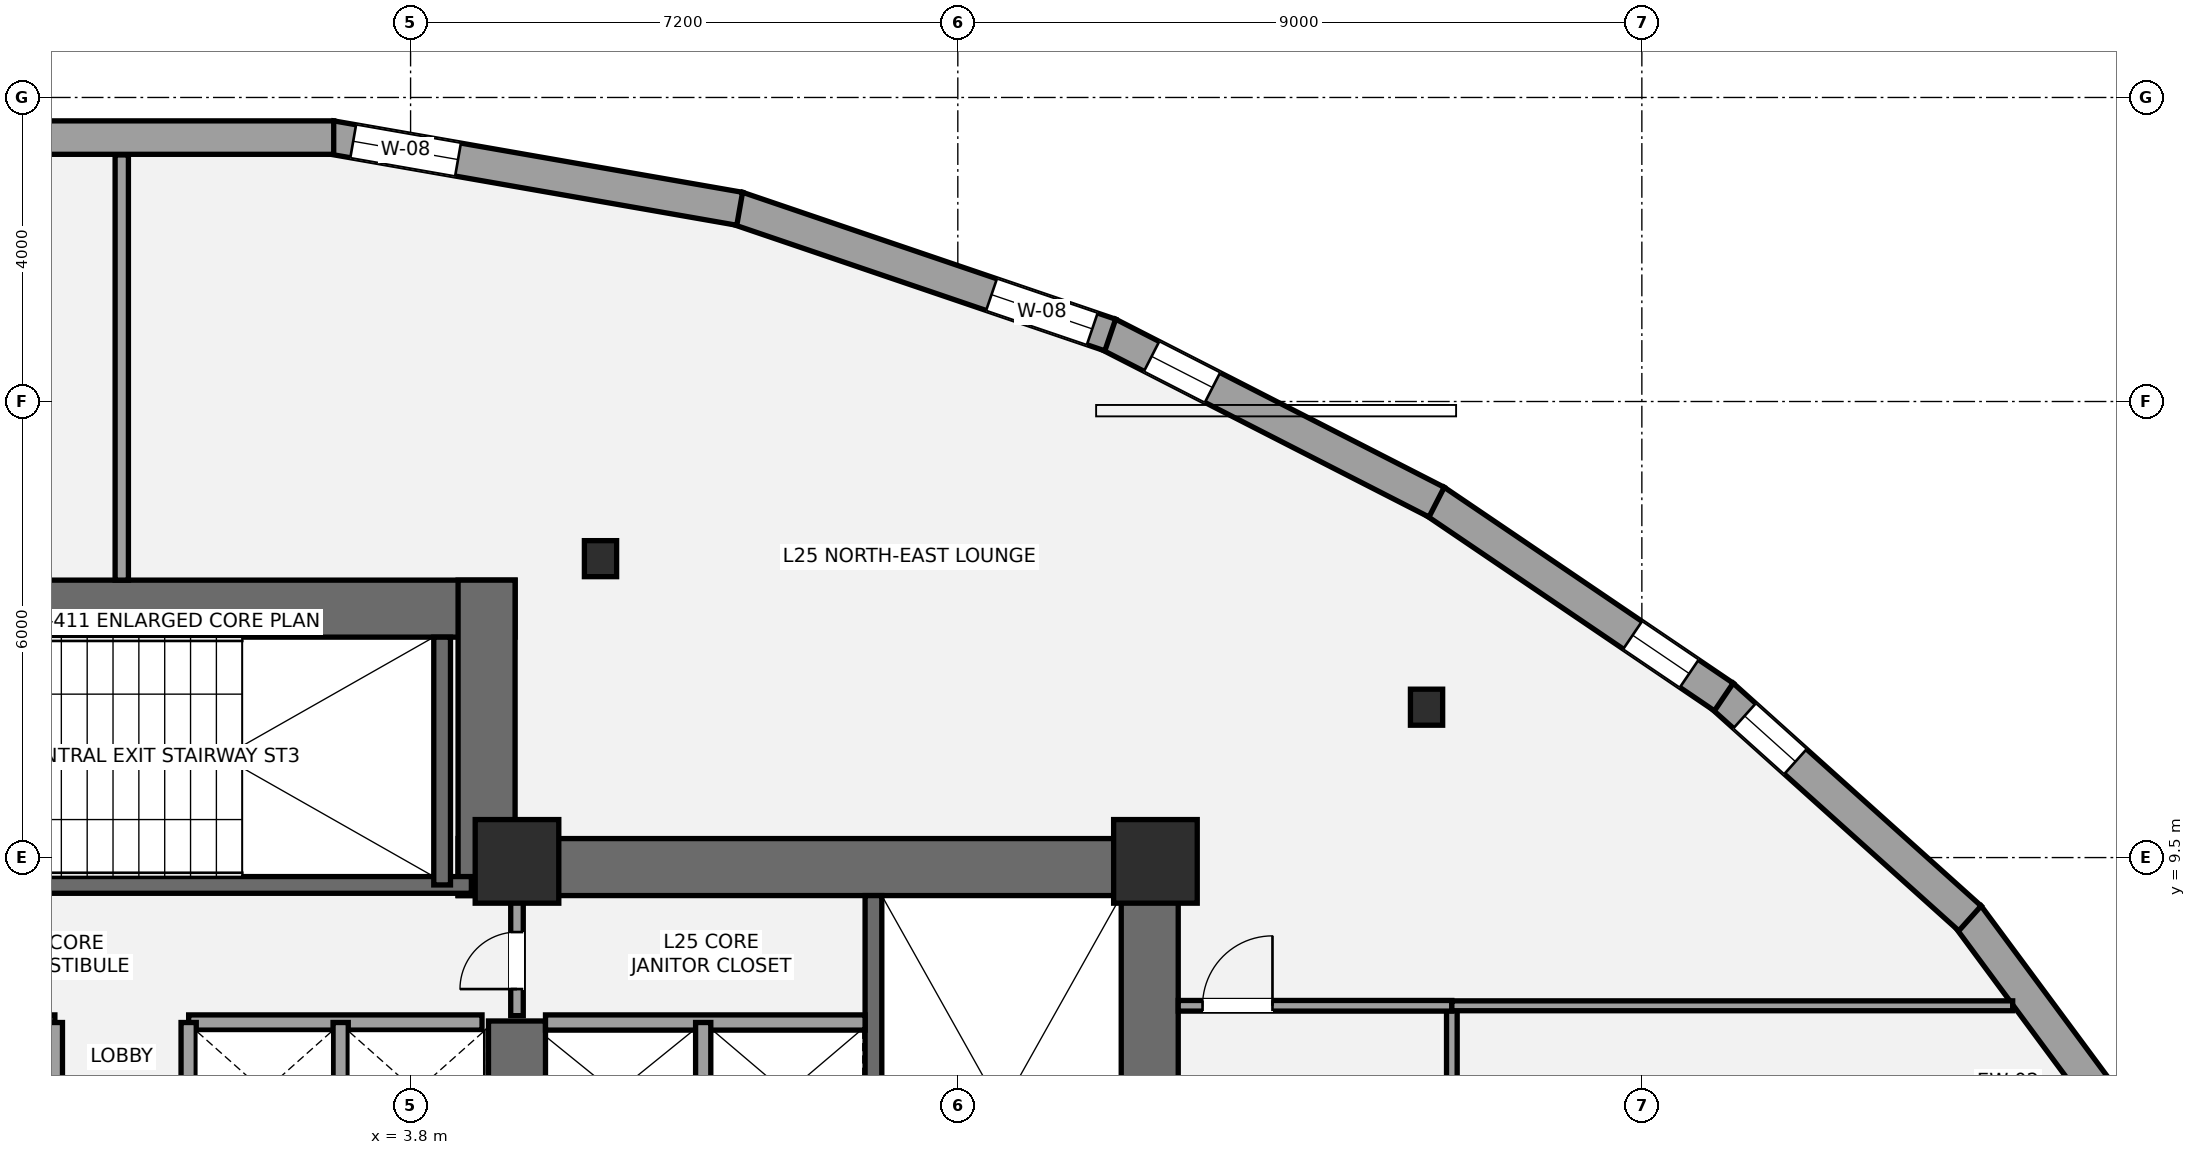
"""IFC4 building model, lengths in metres.
Left out: names, types, materials, properties, quantities, classifications, styles, units other than length and angle.
Written with IfcOpenShell. Run it as: python <this file> out.ifc"""

import sys

from ifc_helpers import new_model, si_unit, direction, frame, frame_2d, origin, origin_2d, place, context, subcontext, project, spatial, rectangle, i_section, extrude, element, fill, save


model = new_model("IFC4")
c1 = context("Model", 3, precision=1e-05, world=origin(), true_north=direction((0.0, 1.0)))
c2 = subcontext(c1, "Body", "Model", "MODEL_VIEW")
j1 = project(units=[si_unit("LENGTHUNIT", "METRE"), si_unit("PLANEANGLEUNIT", "RADIAN")], contexts=[c1])
p1 = place(None, origin())
s1 = spatial("IfcSite", under=j1, at=p1, CompositionType="ELEMENT")
p2 = place(p1, origin())
s2 = spatial("IfcBuilding", under=s1, at=p2, CompositionType="ELEMENT")
p3 = place(p2, frame((0.0, 0.0, 96.6)))
s3 = spatial("IfcBuildingStorey", under=s2, at=p3, CompositionType="ELEMENT", Elevation=96.6)
p4 = place(p3, frame((13.525, 1.1, 0.0), z_axis=(0.0, 0.0, 1.0), x_axis=(0.0, 1.0, 0.0)))
e1 = element("IfcWall", 1, at=p4, inside=s3, PredefinedType="SHEAR", context=c2, shape_type="SweptSolid", body=[
    extrude(rectangle(XDim=8.65, YDim=0.75, at=frame_2d((4.325, 0.0))), origin(), (0.0, 0.0, 1.0), 3.5),
])
p5 = place(p3, frame((4.425, 9.375, 0.0), z_axis=(0.0, 0.0, 1.0), x_axis=(1.0, 0.0, 0.0)))
e2 = element("IfcWall", 2, at=p5, inside=s3, PredefinedType="SHEAR", context=c2, shape_type="SweptSolid", body=[
    extrude(rectangle(XDim=9.475, YDim=0.75, at=frame_2d((4.737, 0.0))), origin(), (0.0, 0.0, 1.0), 3.5),
])
p6 = place(p3, frame((5.2, 5.35, 0.0), z_axis=(0.0, 0.0, 1.0), x_axis=(0.0, 1.0, 0.0)))
e3 = element("IfcWall", 3, at=p6, inside=s3, PredefinedType="SHEAR", context=c2, shape_type="SweptSolid", body=[
    extrude(rectangle(XDim=2.0, YDim=0.75, at=frame_2d((1.0, 0.0))), origin(), (0.0, 0.0, 1.0), 3.5),
])
p7 = place(p3, frame((9.89, 1.85, 0.0), z_axis=(0.0, 0.0, 1.0), x_axis=(0.0, 1.0, 0.0)))
e4 = element("IfcWall", 4, at=p7, inside=s3, PredefinedType="SHEAR", context=c2, shape_type="SweptSolid", body=[
    extrude(rectangle(XDim=7.15, YDim=0.22, at=frame_2d((3.575, 0.0))), origin(), (0.0, 0.0, 1.0), 3.5),
])
p8 = place(p3, frame((-5.175, 12.775, 0.0), z_axis=(0.0, 0.0, 1.0), x_axis=(1.0, 0.0, 0.0)))
e5 = element("IfcWall", 5, at=p8, inside=s3, PredefinedType="SHEAR", context=c2, shape_type="SweptSolid", body=[
    extrude(rectangle(XDim=10.35, YDim=0.75, at=frame_2d((5.175, 0.0))), origin(), (0.0, 0.0, 1.0), 3.5),
])
p9 = place(p3, frame((4.8, 9.0, 0.0), z_axis=(0.0, 0.0, 1.0), x_axis=(0.0, 1.0, 0.0)))
e6 = element("IfcWall", 6, at=p9, inside=s3, PredefinedType="SHEAR", context=c2, shape_type="SweptSolid", body=[
    extrude(rectangle(XDim=4.15, YDim=0.75, at=frame_2d((2.075, 0.0))), origin(), (0.0, 0.0, 1.0), 3.5),
])
p10 = place(p3, frame((-4.7, 9.14, 0.0), z_axis=(0.0, 0.0, 1.0), x_axis=(1.0, 0.0, 0.0)))
e7 = element("IfcWall", 7, at=p10, inside=s3, PredefinedType="SHEAR", context=c2, shape_type="SweptSolid", body=[
    extrude(rectangle(XDim=9.3, YDim=0.22, at=frame_2d((4.65, 0.0))), origin(), (0.0, 0.0, 1.0), 3.5),
])
p11 = place(p10, frame((1.15, 0.0, 0.0)))
e8 = element("IfcOpeningElement", 8, at=p11, cuts=e7, PredefinedType="OPENING", context=c2, shape_type="SweptSolid", body=[
    extrude(rectangle(XDim=1.05, YDim=2.15, at=frame_2d((0.525, 1.075))), frame((0.0, 0.12, 0.0), z_axis=(0.0, -1.0, 0.0), x_axis=(1.0, 0.0, 0.0)), (0.0, 0.0, 1.0), 0.24),
])
p12 = place(p3, frame((4.215, 9.14, 0.0), z_axis=(0.0, 0.0, 1.0), x_axis=(0.0, 1.0, 0.0)))
e9 = element("IfcWall", 9, at=p12, inside=s3, PredefinedType="SHEAR", context=c2, shape_type="SweptSolid", body=[
    extrude(rectangle(XDim=3.26, YDim=0.22, at=frame_2d((1.63, 0.0))), origin(), (0.0, 0.0, 1.0), 3.5),
])
for number, where, z_axis, x_axis in (
    (10, (5.2, 9.45, 0.0), (0.0, 0.0, 1.0), (1.0, 0.0, 0.0)),
    (11, (13.6, 9.45, 0.0), (0.0, 0.0, 1.0), (1.0, 0.0, 0.0)),
):
    element("IfcColumn", number, at=place(p3, frame(where, z_axis=z_axis, x_axis=x_axis)), inside=s3, PredefinedType="COLUMN", context=c2, shape_type="SweptSolid", body=[
        extrude(rectangle(XDim=1.1, YDim=1.1, at=origin_2d()), origin(), (0.0, 0.0, 1.0), 3.5),
    ])
for number, where, z_axis, x_axis in (
    (12, (17.167, 11.478, 0.0), (0.0, 0.0, 1.0), (1.0, 0.0, 0.0)),
    (13, (6.299, 13.433, 0.0), (0.0, 0.0, 1.0), (1.0, 0.0, 0.0)),
):
    element("IfcColumn", number, at=place(p3, frame(where, z_axis=z_axis, x_axis=x_axis)), inside=s3, PredefinedType="COLUMN", context=c2, shape_type="SweptSolid", body=[
        extrude(i_section(OverallWidth=0.424, OverallDepth=0.474, WebThickness=0.048, FlangeThickness=0.077, at=origin_2d()), origin(), (0.0, 0.0, 1.0), 3.5),
    ])
p13 = place(p3, frame((24.287, 8.733, 0.0), z_axis=(0.0, 0.0, 1.0), x_axis=(0.594853677057, -0.803834002075, 0.0)))
e14 = element("IfcWall", 14, at=p13, inside=s3, PredefinedType="STANDARD", context=c2, shape_type="SweptSolid", body=[
    extrude(rectangle(XDim=4.139, YDim=0.44, at=frame_2d((2.07, 0.0))), origin(), (0.0, 0.0, 1.0), 2.528),
])
p14 = place(p13, frame((2.79, 0.0, 0.58)))
e15 = element("IfcOpeningElement", 15, at=p14, cuts=e14, PredefinedType="OPENING", context=c2, shape_type="SweptSolid", body=[
    extrude(rectangle(XDim=0.9, YDim=1.35, at=frame_2d((0.45, 0.675))), frame((0.0, 0.23, 0.0), z_axis=(0.0, -1.0, 0.0), x_axis=(1.0, 0.0, 0.0)), (0.0, 0.0, 1.0), 0.46),
])
p15 = place(p3, frame((21.055, 11.631, 0.0), z_axis=(0.0, 0.0, 1.0), x_axis=(0.743897322515, -0.668293927516, 0.0)))
e16 = element("IfcWall", 16, at=p15, inside=s3, PredefinedType="STANDARD", context=c2, shape_type="SweptSolid", body=[
    extrude(rectangle(XDim=4.385, YDim=0.44, at=frame_2d((2.193, 0.0))), origin(), (0.0, 0.0, 1.0), 2.528),
])
p16 = place(p15, frame((0.399, 0.0, 0.58)))
e17 = element("IfcOpeningElement", 17, at=p16, cuts=e16, PredefinedType="OPENING", context=c2, shape_type="SweptSolid", body=[
    extrude(rectangle(XDim=0.9, YDim=1.35, at=frame_2d((0.45, 0.675))), frame((0.0, 0.23, 0.0), z_axis=(0.0, -1.0, 0.0), x_axis=(1.0, 0.0, 0.0)), (0.0, 0.0, 1.0), 0.46),
])
p17 = place(p3, frame((17.276, 14.19, 0.0), z_axis=(0.0, 0.0, 1.0), x_axis=(0.827740300315, -0.561111392893, 0.0)))
e18 = element("IfcWall", 18, at=p17, inside=s3, PredefinedType="STANDARD", context=c2, shape_type="SweptSolid", body=[
    extrude(rectangle(XDim=4.593, YDim=0.44, at=frame_2d((2.296, 0.0))), origin(), (0.0, 0.0, 1.0), 2.528),
])
p18 = place(p17, frame((3.144, 0.0, 0.58)))
e19 = element("IfcOpeningElement", 19, at=p18, cuts=e18, PredefinedType="OPENING", context=c2, shape_type="SweptSolid", body=[
    extrude(rectangle(XDim=0.9, YDim=1.35, at=frame_2d((0.45, 0.675))), frame((0.0, 0.23, 0.0), z_axis=(0.0, -1.0, 0.0), x_axis=(1.0, 0.0, 0.0)), (0.0, 0.0, 1.0), 0.46),
])
p19 = place(p3, frame((12.976, 16.387, 0.0), z_axis=(0.0, 0.0, 1.0), x_axis=(0.890297461787, -0.455379434687, 0.0)))
e20 = element("IfcWall", 20, at=p19, inside=s3, PredefinedType="STANDARD", context=c2, shape_type="SweptSolid", body=[
    extrude(rectangle(XDim=4.856, YDim=0.44, at=frame_2d((2.428, 0.0))), origin(), (0.0, 0.0, 1.0), 2.528),
])
p20 = place(p19, frame((0.645, 0.0, 0.58)))
e21 = element("IfcOpeningElement", 21, at=p20, cuts=e20, PredefinedType="OPENING", context=c2, shape_type="SweptSolid", body=[
    extrude(rectangle(XDim=0.9, YDim=1.35, at=frame_2d((0.45, 0.675))), frame((0.0, 0.23, 0.0), z_axis=(0.0, -1.0, 0.0), x_axis=(1.0, 0.0, 0.0)), (0.0, 0.0, 1.0), 0.46),
])
p21 = place(p3, frame((8.097, 18.044, 0.0), z_axis=(0.0, 0.0, 1.0), x_axis=(0.946763558794, -0.321929749697, 0.0)))
e22 = element("IfcWall", 22, at=p21, inside=s3, PredefinedType="STANDARD", context=c2, shape_type="SweptSolid", body=[
    extrude(rectangle(XDim=5.184, YDim=0.44, at=frame_2d((2.592, 0.0))), origin(), (0.0, 0.0, 1.0), 2.528),
])
p22 = place(p21, frame((3.534, 0.0, 0.58)))
e23 = element("IfcOpeningElement", 23, at=p22, cuts=e22, PredefinedType="OPENING", context=c2, shape_type="SweptSolid", body=[
    extrude(rectangle(XDim=1.4, YDim=1.55, at=frame_2d((0.7, 0.775))), frame((0.0, 0.23, 0.0), z_axis=(0.0, -1.0, 0.0), x_axis=(1.0, 0.0, 0.0)), (0.0, 0.0, 1.0), 0.46),
])
p23 = place(p3, frame((2.751, 18.975, 0.0), z_axis=(0.0, 0.0, 1.0), x_axis=(0.985074276728, -0.172129803722, 0.0)))
e24 = element("IfcWall", 24, at=p23, inside=s3, PredefinedType="STANDARD", context=c2, shape_type="SweptSolid", body=[
    extrude(rectangle(XDim=5.461, YDim=0.44, at=frame_2d((2.73, 0.0))), origin(), (0.0, 0.0, 1.0), 2.528),
])
p24 = place(p23, frame((0.299, 0.0, 0.58)))
e25 = element("IfcOpeningElement", 25, at=p24, cuts=e24, PredefinedType="OPENING", context=c2, shape_type="SweptSolid", body=[
    extrude(rectangle(XDim=1.4, YDim=1.55, at=frame_2d((0.7, 0.775))), frame((0.0, 0.23, 0.0), z_axis=(0.0, -1.0, 0.0), x_axis=(1.0, 0.0, 0.0)), (0.0, 0.0, 1.0), 0.46),
])
p25 = place(p3, frame((-2.789, 18.972, 0.0), z_axis=(0.0, 0.0, 1.0), x_axis=(1.0, 0.0, 0.0)))
e26 = element("IfcWall", 26, at=p25, inside=s3, PredefinedType="STANDARD", context=c2, shape_type="SweptSolid", body=[
    extrude(rectangle(XDim=5.577, YDim=0.44, at=frame_2d((2.789, 0.0))), origin(), (0.0, 0.0, 1.0), 2.528),
])
p26 = place(p25, frame((0.2, 0.0, 0.65)))
e27 = element("IfcOpeningElement", 27, at=p26, cuts=e26, PredefinedType="OPENING", context=c2, shape_type="SweptSolid", body=[
    extrude(rectangle(XDim=1.5, YDim=1.7, at=frame_2d((0.75, 0.85))), frame((0.0, 0.23, 0.0), z_axis=(0.0, -1.0, 0.0), x_axis=(1.0, 0.0, 0.0)), (0.0, 0.0, 1.0), 0.46),
])
p27 = place(p3, frame((5.575, 7.33, 0.0), z_axis=(0.0, 0.0, 1.0), x_axis=(1.0, 0.0, 0.0)))
e28 = element("IfcWall", 28, at=p27, inside=s3, PredefinedType="SOLIDWALL", context=c2, shape_type="SweptSolid", body=[
    extrude(rectangle(XDim=4.205, YDim=0.2, at=frame_2d((2.103, 0.0))), origin(), (0.0, 0.0, 1.0), 3.31),
])
p28 = place(p3, frame((7.65, 5.47, 0.0), z_axis=(0.0, 0.0, 1.0), x_axis=(0.0, 1.0, 0.0)))
e29 = element("IfcWall", 29, at=p28, inside=s3, PredefinedType="SOLIDWALL", context=c2, shape_type="SweptSolid", body=[
    extrude(rectangle(XDim=1.86, YDim=0.2, at=frame_2d((0.93, 0.0))), origin(), (0.0, 0.0, 1.0), 3.31),
])
for number, where, z_axis, x_axis in (
    (30, (-4.74, 7.33, 0.0), (0.0, 0.0, 1.0), (1.0, 0.0, 0.0)),
    (31, (0.88, 7.33, 0.0), (0.0, 0.0, 1.0), (1.0, 0.0, 0.0)),
):
    element("IfcWall", number, at=place(p3, frame(where, z_axis=z_axis, x_axis=x_axis)), inside=s3, PredefinedType="SOLIDWALL", context=c2, shape_type="SweptSolid", body=[
        extrude(rectangle(XDim=3.86, YDim=0.2, at=frame_2d((1.93, 0.0))), origin(), (0.0, 0.0, 1.0), 3.31),
    ])
for number, where, z_axis, x_axis in (
    (32, (2.88, 5.52, 0.0), (0.0, 0.0, 1.0), (0.0, 1.0, 0.0)),
    (33, (-0.88, 5.52, 0.0), (0.0, 0.0, 1.0), (0.0, 1.0, 0.0)),
    (34, (0.88, 5.52, 0.0), (0.0, 0.0, 1.0), (0.0, 1.0, 0.0)),
):
    element("IfcWall", number, at=place(p3, frame(where, z_axis=z_axis, x_axis=x_axis)), inside=s3, PredefinedType="SOLIDWALL", context=c2, shape_type="SweptSolid", body=[
        extrude(rectangle(XDim=1.81, YDim=0.2, at=frame_2d((0.905, 0.0))), origin(), (0.0, 0.0, 1.0), 3.31),
    ])
p29 = place(p3, frame((5.2, 7.42, 0.0), z_axis=(0.0, 0.0, 1.0), x_axis=(0.0, 1.0, 0.0)))
e35 = element("IfcWall", 35, at=p29, inside=s3, PredefinedType="PARTITIONING", context=c2, shape_type="SweptSolid", body=[
    extrude(rectangle(XDim=1.58, YDim=0.165, at=frame_2d((0.79, 0.0))), origin(), (0.0, 0.0, 1.0), 3.31),
])
p30 = place(p29, frame((0.35, 0.0, 0.0)))
e36 = element("IfcOpeningElement", 36, at=p30, cuts=e35, PredefinedType="OPENING", context=c2, shape_type="SweptSolid", body=[
    extrude(rectangle(XDim=0.75, YDim=2.1, at=frame_2d((0.375, 1.05))), frame((0.0, 0.093, 0.0), z_axis=(0.0, -1.0, 0.0), x_axis=(1.0, 0.0, 0.0)), (0.0, 0.0, 1.0), 0.185),
])
p31 = place(p3, frame((17.5, -13.763, 0.0), z_axis=(0.0, 0.0, 1.0), x_axis=(0.0, 1.0, 0.0)))
e37 = element("IfcWall", 37, at=p31, inside=s3, PredefinedType="PARTITIONING", context=c2, shape_type="SweptSolid", body=[
    extrude(rectangle(XDim=21.313, YDim=0.14, at=frame_2d((10.656, 0.0))), origin(), (0.0, 0.0, 1.0), 2.688),
])
p32 = place(p31, frame((10.963, 0.0, 0.0)))
e38 = element("IfcOpeningElement", 38, at=p32, cuts=e37, PredefinedType="OPENING", context=c2, shape_type="SweptSolid", body=[
    extrude(rectangle(XDim=0.9, YDim=2.1, at=frame_2d((0.45, 1.05))), frame((0.0, 0.08, 0.0), z_axis=(0.0, -1.0, 0.0), x_axis=(1.0, 0.0, 0.0)), (0.0, 0.0, 1.0), 0.16),
])
p33 = place(p31, frame((18.188, 0.0, 0.0)))
e39 = element("IfcOpeningElement", 39, at=p33, cuts=e37, PredefinedType="OPENING", context=c2, shape_type="SweptSolid", body=[
    extrude(rectangle(XDim=0.9, YDim=2.1, at=frame_2d((0.45, 1.05))), frame((0.0, 0.08, 0.0), z_axis=(0.0, -1.0, 0.0), x_axis=(1.0, 0.0, 0.0)), (0.0, 0.0, 1.0), 0.16),
])
p34 = place(p3, frame((13.9, 7.55, 0.0), z_axis=(0.0, 0.0, 1.0), x_axis=(1.0, 0.0, 0.0)))
e40 = element("IfcWall", 40, at=p34, inside=s3, PredefinedType="PARTITIONING", context=c2, shape_type="SweptSolid", body=[
    extrude(rectangle(XDim=3.6, YDim=0.14, at=frame_2d((1.8, 0.0))), origin(), (0.0, 0.0, 1.0), 2.763),
])
p35 = place(p34, frame((0.32, 0.0, 0.0)))
e41 = element("IfcOpeningElement", 41, at=p35, cuts=e40, PredefinedType="OPENING", context=c2, shape_type="SweptSolid", body=[
    extrude(rectangle(XDim=0.92, YDim=2.15, at=frame_2d((0.46, 1.075))), frame((0.0, 0.08, 0.0), z_axis=(0.0, -1.0, 0.0), x_axis=(1.0, 0.0, 0.0)), (0.0, 0.0, 1.0), 0.16),
])
p36 = place(p3, frame((0.0, 13.15, 0.0), z_axis=(0.0, 0.0, 1.0), x_axis=(0.0, 1.0, 0.0)))
e42 = element("IfcWall", 42, at=p36, inside=s3, PredefinedType="PARTITIONING", context=c2, shape_type="SweptSolid", body=[
    extrude(rectangle(XDim=5.594, YDim=0.175, at=frame_2d((2.797, 0.0))), origin(), (0.0, 0.0, 1.0), 3.31),
])
p37 = place(p3, frame((17.5, 7.55, 0.0), z_axis=(0.0, 0.0, 1.0), x_axis=(1.0, 0.0, 0.0)))
e43 = element("IfcWall", 43, at=p37, inside=s3, PredefinedType="PARTITIONING", context=c2, shape_type="SweptSolid", body=[
    extrude(rectangle(XDim=7.379, YDim=0.13, at=frame_2d((3.689, 0.0))), origin(), (0.0, 0.0, 1.0), 2.763),
])
p38 = place(p16, origin())
e44 = element("IfcWindow", 44, at=p38, inside=s3, PartitioningType="SINGLE_PANEL", PredefinedType="WINDOW", context=c2, shape_type="SweptSolid", body=[
    extrude(rectangle(XDim=0.9, YDim=1.35, at=frame_2d((0.45, 0.675))), frame((0.0, -0.01, 0.0), z_axis=(0.0, -1.0, 0.0), x_axis=(1.0, 0.0, 0.0)), (0.0, 0.0, 1.0), 0.06),
])
fill(e17, e44)
p39 = place(p18, origin())
e45 = element("IfcWindow", 45, at=p39, inside=s3, PartitioningType="SINGLE_PANEL", PredefinedType="WINDOW", context=c2, shape_type="SweptSolid", body=[
    extrude(rectangle(XDim=0.9, YDim=1.35, at=frame_2d((0.45, 0.675))), frame((0.0, -0.01, 0.0), z_axis=(0.0, -1.0, 0.0), x_axis=(1.0, 0.0, 0.0)), (0.0, 0.0, 1.0), 0.06),
])
fill(e19, e45)
p40 = place(p20, origin())
e46 = element("IfcWindow", 46, at=p40, inside=s3, PartitioningType="SINGLE_PANEL", PredefinedType="WINDOW", context=c2, shape_type="SweptSolid", body=[
    extrude(rectangle(XDim=0.9, YDim=1.35, at=frame_2d((0.45, 0.675))), frame((0.0, -0.01, 0.0), z_axis=(0.0, -1.0, 0.0), x_axis=(1.0, 0.0, 0.0)), (0.0, 0.0, 1.0), 0.06),
])
fill(e21, e46)
p41 = place(p22, origin())
e47 = element("IfcWindow", 47, at=p41, inside=s3, PartitioningType="SINGLE_PANEL", PredefinedType="WINDOW", context=c2, shape_type="SweptSolid", body=[
    extrude(rectangle(XDim=1.4, YDim=1.55, at=frame_2d((0.7, 0.775))), frame((0.0, -0.01, 0.0), z_axis=(0.0, -1.0, 0.0), x_axis=(1.0, 0.0, 0.0)), (0.0, 0.0, 1.0), 0.06),
])
fill(e23, e47)
p42 = place(p24, origin())
e48 = element("IfcWindow", 48, at=p42, inside=s3, PartitioningType="SINGLE_PANEL", PredefinedType="WINDOW", context=c2, shape_type="SweptSolid", body=[
    extrude(rectangle(XDim=1.4, YDim=1.55, at=frame_2d((0.7, 0.775))), frame((0.0, -0.01, 0.0), z_axis=(0.0, -1.0, 0.0), x_axis=(1.0, 0.0, 0.0)), (0.0, 0.0, 1.0), 0.06),
])
fill(e25, e48)
p43 = place(p30, origin())
e49 = element("IfcDoor", 49, at=p43, inside=s3, OperationType="SINGLE_SWING_LEFT", PredefinedType="DOOR", context=c2, shape_type="SweptSolid", body=[
    extrude(rectangle(XDim=0.75, YDim=2.1, at=frame_2d((0.375, 1.05))), frame((0.0, 0.025, 0.0), z_axis=(0.0, -1.0, 0.0), x_axis=(1.0, 0.0, 0.0)), (0.0, 0.0, 1.0), 0.05),
])
fill(e36, e49)
p44 = place(p35, origin())
e50 = element("IfcDoor", 50, at=p44, inside=s3, OperationType="SINGLE_SWING_RIGHT", PredefinedType="DOOR", context=c2, shape_type="SweptSolid", body=[
    extrude(rectangle(XDim=0.92, YDim=2.15, at=frame_2d((0.46, 1.075))), frame((0.0, 0.025, 0.0), z_axis=(0.0, -1.0, 0.0), x_axis=(1.0, 0.0, 0.0)), (0.0, 0.0, 1.0), 0.05),
])
fill(e41, e50)
save(model, sys.argv[1])
